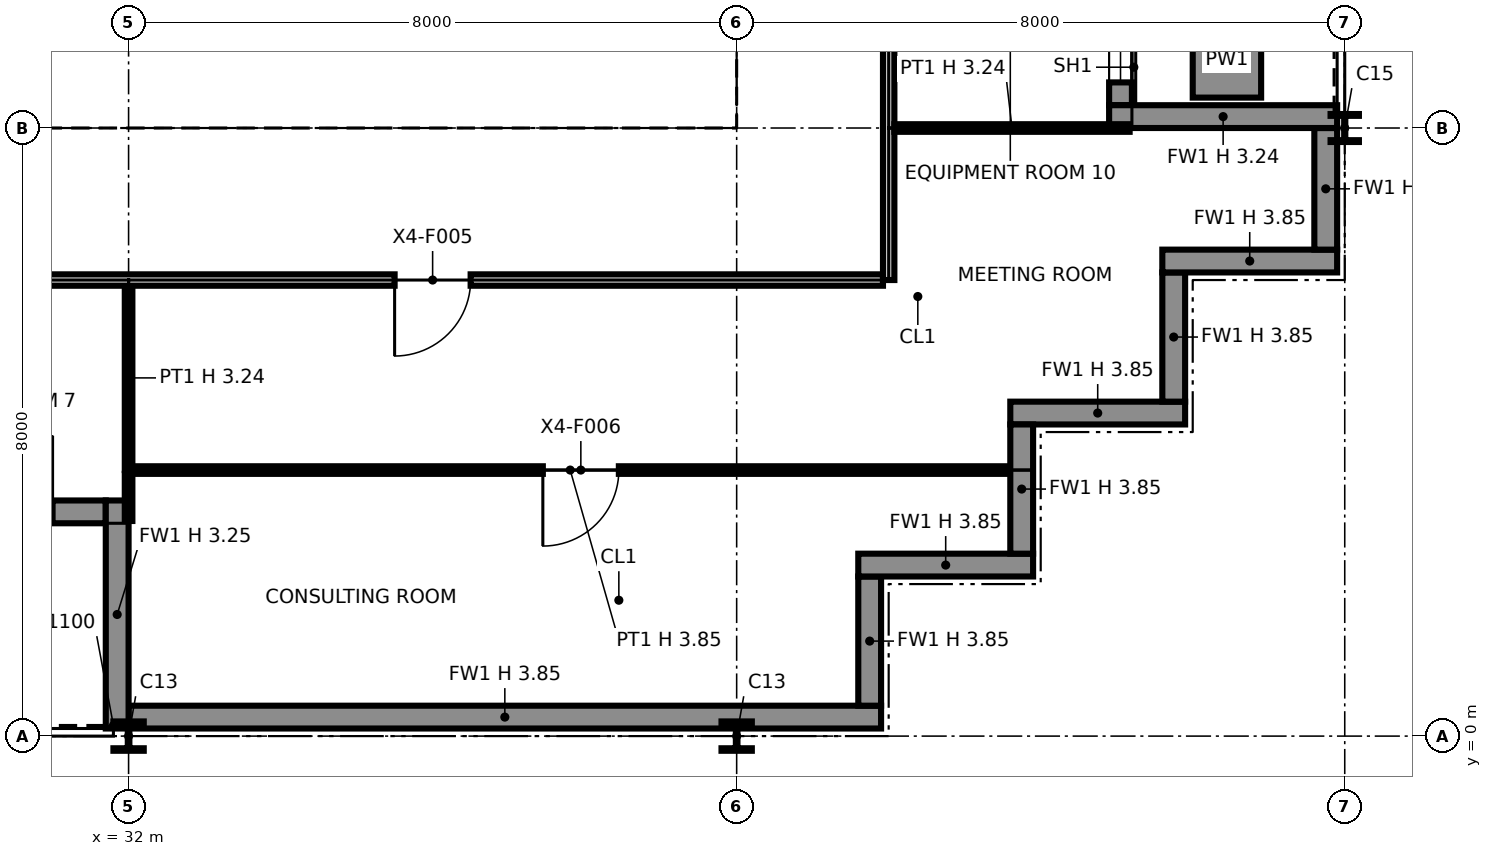
"""IFC4 building model, lengths in metres.
Left out: names, types, materials, properties, quantities, classifications, styles, units other than length and angle.
Written with IfcOpenShell. Run it as: python <this file> out.ifc"""

import sys

from ifc_helpers import new_model, si_unit, direction, frame, frame_2d, origin, origin_2d, place, context, subcontext, project, spatial, polyline, rectangle, i_section, outline, extrude, element, fill, save


model = new_model("IFC4")
c1 = context("Model", 3, precision=1e-05, world=origin(), true_north=direction((0.0, 1.0)))
c2 = subcontext(c1, "Body", "Model", "MODEL_VIEW")
j1 = project(units=[si_unit("LENGTHUNIT", "METRE"), si_unit("PLANEANGLEUNIT", "RADIAN")], contexts=[c1])
p1 = place(None, origin())
s1 = spatial("IfcSite", under=j1, at=p1, CompositionType="ELEMENT")
p2 = place(p1, origin())
s2 = spatial("IfcBuilding", under=s1, at=p2, CompositionType="ELEMENT")
p3 = place(p2, frame((0.0, 0.0, 279.0)))
s3 = spatial("IfcBuildingStorey", under=s2, at=p3, CompositionType="ELEMENT", Elevation=279.0)
p4 = place(p3, frame((32.0, 0.0, 0.0), z_axis=(0.0, 0.0, 1.0), x_axis=(1.0, 0.0, 0.0)))
e1 = element("IfcColumn", 1, at=p4, inside=s3, PredefinedType="COLUMN", context=c2, shape_type="SweptSolid", body=[
    extrude(i_section(OverallWidth=0.399, OverallDepth=0.386, WebThickness=0.021, FlangeThickness=0.033, at=origin_2d()), origin(), (0.0, 0.0, 1.0), 3.85),
])
p5 = place(p3, frame((32.0, 8.0, 0.0), z_axis=(0.0, 0.0, 1.0), x_axis=(1.0, 0.0, 0.0)))
e2 = element("IfcColumn", 2, at=p5, inside=s3, PredefinedType="COLUMN", context=c2, shape_type="SweptSolid", body=[
    extrude(i_section(OverallWidth=0.257, OverallDepth=0.363, WebThickness=0.013, FlangeThickness=0.022, at=origin_2d()), origin(), (0.0, 0.0, 1.0), 3.85),
])
p6 = place(p3, frame((40.0, 0.0, 0.0), z_axis=(0.0, 0.0, 1.0), x_axis=(1.0, 0.0, 0.0)))
e3 = element("IfcColumn", 3, at=p6, inside=s3, PredefinedType="COLUMN", context=c2, shape_type="SweptSolid", body=[
    extrude(i_section(OverallWidth=0.399, OverallDepth=0.386, WebThickness=0.021, FlangeThickness=0.033, at=origin_2d()), origin(), (0.0, 0.0, 1.0), 3.85),
])
p7 = place(p3, frame((40.0, 8.0, 0.0), z_axis=(0.0, 0.0, 1.0), x_axis=(1.0, 0.0, 0.0)))
e4 = element("IfcColumn", 4, at=p7, inside=s3, PredefinedType="COLUMN", context=c2, shape_type="SweptSolid", body=[
    extrude(i_section(OverallWidth=0.257, OverallDepth=0.363, WebThickness=0.013, FlangeThickness=0.022, at=origin_2d()), origin(), (0.0, 0.0, 1.0), 3.85),
])
p8 = place(p3, frame((48.0, 8.0, 0.0), z_axis=(0.0, 0.0, 1.0), x_axis=(1.0, 0.0, 0.0)))
e5 = element("IfcColumn", 5, at=p8, inside=s3, PredefinedType="COLUMN", context=c2, shape_type="SweptSolid", body=[
    extrude(i_section(OverallWidth=0.373, OverallDepth=0.368, WebThickness=0.015, FlangeThickness=0.024, at=origin_2d()), origin(), (0.0, 0.0, 1.0), 3.85),
])
p9 = place(p3, frame((24.3, 2.95, 0.0), z_axis=(0.0, 0.0, 1.0), x_axis=(1.0, 0.0, 0.0)))
e6 = element("IfcWall", 6, at=p9, inside=s3, PredefinedType="SOLIDWALL", context=c2, shape_type="SweptSolid", body=[
    extrude(rectangle(XDim=7.4, YDim=0.3, at=frame_2d((3.7, 0.0))), origin(), (0.0, 0.0, 1.0), 3.85),
])
p10 = place(p9, frame((0.3, 0.0, 0.9)))
e7 = element("IfcOpeningElement", 7, at=p10, cuts=e6, PredefinedType="OPENING", context=c2, shape_type="SweptSolid", body=[
    extrude(rectangle(XDim=2.8, YDim=2.2, at=frame_2d((1.4, 1.1))), frame((0.0, 0.16, 0.0), z_axis=(0.0, -1.0, 0.0), x_axis=(1.0, 0.0, 0.0)), (0.0, 0.0, 1.0), 0.32),
])
p11 = place(p9, frame((4.7, 0.0, 0.0)))
e8 = element("IfcOpeningElement", 8, at=p11, cuts=e6, PredefinedType="OPENING", context=c2, shape_type="SweptSolid", body=[
    extrude(rectangle(XDim=2.0, YDim=2.4, at=frame_2d((1.0, 1.2))), frame((0.0, 0.16, 0.0), z_axis=(0.0, -1.0, 0.0), x_axis=(1.0, 0.0, 0.0)), (0.0, 0.0, 1.0), 0.32),
])
p12 = place(p3, frame((31.85, 0.1, 0.0), z_axis=(0.0, 0.0, 1.0), x_axis=(0.0, 1.0, 0.0)))
e9 = element("IfcWall", 9, at=p12, inside=s3, PredefinedType="SOLIDWALL", context=c2, shape_type="SweptSolid", body=[
    extrude(rectangle(XDim=3.0, YDim=0.3, at=frame_2d((1.5, 0.0))), origin(), (0.0, 0.0, 1.0), 3.247),
])
p13 = place(p3, frame((32.0, 0.25, 0.0), z_axis=(0.0, 0.0, 1.0), x_axis=(1.0, 0.0, 0.0)))
e10 = element("IfcWall", 10, at=p13, inside=s3, PredefinedType="SOLIDWALL", context=c2, shape_type="SweptSolid", body=[
    extrude(rectangle(XDim=9.9, YDim=0.3, at=frame_2d((4.95, 0.0))), origin(), (0.0, 0.0, 1.0), 3.85),
])
p14 = place(p3, frame((41.75, 0.4, 0.0), z_axis=(0.0, 0.0, 1.0), x_axis=(0.0, 1.0, 0.0)))
e11 = element("IfcWall", 11, at=p14, inside=s3, PredefinedType="SOLIDWALL", context=c2, shape_type="SweptSolid", body=[
    extrude(rectangle(XDim=1.7, YDim=0.3, at=frame_2d((0.85, 0.0))), origin(), (0.0, 0.0, 1.0), 3.85),
])
p15 = place(p3, frame((41.6, 2.25, 0.0), z_axis=(0.0, 0.0, 1.0), x_axis=(1.0, 0.0, 0.0)))
e12 = element("IfcWall", 12, at=p15, inside=s3, PredefinedType="SOLIDWALL", context=c2, shape_type="SweptSolid", body=[
    extrude(rectangle(XDim=2.3, YDim=0.3, at=frame_2d((1.15, 0.0))), origin(), (0.0, 0.0, 1.0), 3.85),
])
p16 = place(p3, frame((43.75, 2.4, 0.0), z_axis=(0.0, 0.0, 1.0), x_axis=(0.0, 1.0, 0.0)))
e13 = element("IfcWall", 13, at=p16, inside=s3, PredefinedType="SOLIDWALL", context=c2, shape_type="SweptSolid", body=[
    extrude(rectangle(XDim=1.7, YDim=0.3, at=frame_2d((0.85, 0.0))), origin(), (0.0, 0.0, 1.0), 3.85),
])
p17 = place(p3, frame((43.6, 4.25, 0.0), z_axis=(0.0, 0.0, 1.0), x_axis=(1.0, 0.0, 0.0)))
e14 = element("IfcWall", 14, at=p17, inside=s3, PredefinedType="SOLIDWALL", context=c2, shape_type="SweptSolid", body=[
    extrude(rectangle(XDim=2.3, YDim=0.3, at=frame_2d((1.15, 0.0))), origin(), (0.0, 0.0, 1.0), 3.85),
])
p18 = place(p3, frame((45.75, 4.4, 0.0), z_axis=(0.0, 0.0, 1.0), x_axis=(0.0, 1.0, 0.0)))
e15 = element("IfcWall", 15, at=p18, inside=s3, PredefinedType="SOLIDWALL", context=c2, shape_type="SweptSolid", body=[
    extrude(rectangle(XDim=1.7, YDim=0.3, at=frame_2d((0.85, 0.0))), origin(), (0.0, 0.0, 1.0), 3.85),
])
p19 = place(p3, frame((45.6, 6.25, 0.0), z_axis=(0.0, 0.0, 1.0), x_axis=(1.0, 0.0, 0.0)))
e16 = element("IfcWall", 16, at=p19, inside=s3, PredefinedType="SOLIDWALL", context=c2, shape_type="SweptSolid", body=[
    extrude(rectangle(XDim=2.3, YDim=0.3, at=frame_2d((1.15, 0.0))), origin(), (0.0, 0.0, 1.0), 3.85),
])
p20 = place(p3, frame((47.75, 6.4, 0.0), z_axis=(0.0, 0.0, 1.0), x_axis=(0.0, 1.0, 0.0)))
e17 = element("IfcWall", 17, at=p20, inside=s3, PredefinedType="SOLIDWALL", context=c2, shape_type="SweptSolid", body=[
    extrude(rectangle(XDim=1.6, YDim=0.3, at=frame_2d((0.8, 0.0))), origin(), (0.0, 0.0, 1.0), 3.85),
])
p21 = place(p3, frame((45.05, 8.3, 0.0), z_axis=(0.0, 0.0, 1.0), x_axis=(0.0, 1.0, 0.0)))
e18 = element("IfcWall", 18, at=p21, inside=s3, PredefinedType="SOLIDWALL", context=c2, shape_type="SweptSolid", body=[
    extrude(rectangle(XDim=7.4, YDim=0.3, at=frame_2d((3.7, 0.0))), origin(), (0.0, 0.0, 1.0), 3.85),
])
p22 = place(p21, frame((0.3, 0.0, 0.9)))
e19 = element("IfcOpeningElement", 19, at=p22, cuts=e18, PredefinedType="OPENING", context=c2, shape_type="SweptSolid", body=[
    extrude(rectangle(XDim=2.8, YDim=2.2, at=frame_2d((1.4, 1.1))), frame((0.0, 0.16, 0.0), z_axis=(0.0, -1.0, 0.0), x_axis=(1.0, 0.0, 0.0)), (0.0, 0.0, 1.0), 0.32),
])
p23 = place(p21, frame((4.7, 0.0, 0.0)))
e20 = element("IfcOpeningElement", 20, at=p23, cuts=e18, PredefinedType="OPENING", context=c2, shape_type="SweptSolid", body=[
    extrude(rectangle(XDim=2.0, YDim=2.4, at=frame_2d((1.0, 1.2))), frame((0.0, 0.16, 0.0), z_axis=(0.0, -1.0, 0.0), x_axis=(1.0, 0.0, 0.0)), (0.0, 0.0, 1.0), 0.32),
])
p24 = place(p3, frame((47.9, 8.15, 0.0), z_axis=(0.0, 0.0, 1.0), x_axis=(-1.0, 0.0, 0.0)))
e21 = element("IfcWall", 21, at=p24, inside=s3, PredefinedType="SOLIDWALL", context=c2, shape_type="SweptSolid", body=[
    extrude(rectangle(XDim=3.0, YDim=0.3, at=frame_2d((1.5, 0.0))), origin(), (0.0, 0.0, 1.0), 3.237),
])
p25 = place(p3, frame((46.45, 8.4, 0.0), z_axis=(0.0, 0.0, 1.0), x_axis=(0.0, 1.0, 0.0)))
e22 = element("IfcWall", 22, at=p25, inside=s3, PredefinedType="SOLIDWALL", context=c2, shape_type="SweptSolid", body=[
    extrude(rectangle(XDim=3.2, YDim=0.9, at=frame_2d((1.6, 0.0))), origin(), (0.0, 0.0, 1.0), 0.6),
])
p26 = place(p3, frame((24.65, 8.75, 0.0), z_axis=(0.0, 0.0, 1.0), x_axis=(1.0, 0.0, 0.0)))
e23 = element("IfcWall", 23, at=p26, inside=s3, PredefinedType="PARTITIONING", context=c2, shape_type="SweptSolid", body=[
    extrude(outline(polyline([(0.0, 0.0), (14.7, 0.0), (14.7, 3.85), (7.438, 3.85), (7.437, 3.318), (7.263, 3.318), (7.262, 3.85), (0.0, 3.85), (0.0, 0.0)])), frame((0.0, 0.1, 0.0), z_axis=(0.0, -1.0, 0.0), x_axis=(1.0, 0.0, 0.0)), (0.0, 0.0, 1.0), 0.2),
])
p27 = place(p3, frame((32.0, 8.85, 0.0), z_axis=(0.0, 0.0, 1.0), x_axis=(0.0, 1.0, 0.0)))
e24 = element("IfcWall", 24, at=p27, inside=s3, PredefinedType="PARTITIONING", context=c2, shape_type="SweptSolid", body=[
    extrude(rectangle(XDim=2.55, YDim=0.6, at=frame_2d((1.275, 0.0))), origin(), (0.0, 0.0, 1.0), 3.318),
])
for number, where, z_axis, x_axis in (
    (25, (35.6, 8.85, 0.0), (0.0, 0.0, 1.0), (0.0, 1.0, 0.0)),
    (26, (39.25, 8.85, 0.0), (0.0, 0.0, 1.0), (0.0, 1.0, 0.0)),
):
    element("IfcWall", number, at=place(p3, frame(where, z_axis=z_axis, x_axis=x_axis)), inside=s3, PredefinedType="PARTITIONING", context=c2, shape_type="SweptSolid", body=[
        extrude(rectangle(XDim=6.3, YDim=0.2, at=frame_2d((3.15, 0.0))), origin(), (0.0, 0.0, 1.0), 3.85),
    ])
p28 = place(p3, frame((32.0, 2.83, 0.0), z_axis=(0.0, 0.0, 1.0), x_axis=(0.0, 1.0, 0.0)))
e27 = element("IfcWall", 27, at=p28, inside=s3, PredefinedType="PARTITIONING", context=c2, shape_type="SweptSolid", body=[
    extrude(rectangle(XDim=0.62, YDim=0.1, at=frame_2d((0.31, 0.0))), origin(), (0.0, 0.0, 1.0), 3.238),
])
p29 = place(p3, frame((32.05, 3.5, 0.0), z_axis=(0.0, 0.0, 1.0), x_axis=(1.0, 0.0, 0.0)))
e28 = element("IfcWall", 28, at=p29, inside=s3, PredefinedType="PARTITIONING", context=c2, shape_type="SweptSolid", body=[
    extrude(rectangle(XDim=11.52, YDim=0.1, at=frame_2d((5.76, 0.0))), origin(), (0.0, 0.0, 1.0), 3.85),
])
p30 = place(p29, frame((6.4, 0.0, 0.0), z_axis=(0.0, 0.0, 1.0), x_axis=(-1.0, 0.0, 0.0)))
e29 = element("IfcOpeningElement", 29, at=p30, cuts=e28, PredefinedType="OPENING", context=c2, shape_type="SweptSolid", body=[
    extrude(rectangle(XDim=1.0, YDim=2.1, at=frame_2d((0.5, 1.05))), frame((0.0, 0.06, 0.0), z_axis=(0.0, -1.0, 0.0), x_axis=(1.0, 0.0, 0.0)), (0.0, 0.0, 1.0), 0.12),
])
p31 = place(p3, frame((32.0, 3.5, 0.0), z_axis=(0.0, 0.0, 1.0), x_axis=(0.0, 1.0, 0.0)))
e30 = element("IfcWall", 30, at=p31, inside=s3, PredefinedType="PARTITIONING", context=c2, shape_type="SweptSolid", body=[
    extrude(rectangle(XDim=2.425, YDim=0.1, at=frame_2d((1.212, 0.0))), origin(), (0.0, 0.0, 1.0), 3.238),
])
p32 = place(p3, frame((6.075, 6.0, 0.0), z_axis=(0.0, 0.0, 1.0), x_axis=(1.0, 0.0, 0.0)))
e31 = element("IfcWall", 31, at=p32, inside=s3, PredefinedType="PARTITIONING", context=c2, shape_type="SweptSolid", body=[
    extrude(rectangle(XDim=35.85, YDim=0.15, at=frame_2d((17.925, 0.0))), origin(), (0.0, 0.0, 1.0), 3.85),
])
p33 = place(p32, frame((12.425, 0.0, 0.0), z_axis=(0.0, 0.0, 1.0), x_axis=(-1.0, 0.0, 0.0)))
e32 = element("IfcOpeningElement", 32, at=p33, cuts=e31, PredefinedType="OPENING", context=c2, shape_type="SweptSolid", body=[
    extrude(rectangle(XDim=1.0, YDim=2.1, at=frame_2d((0.5, 1.05))), frame((0.0, 0.085, 0.0), z_axis=(0.0, -1.0, 0.0), x_axis=(1.0, 0.0, 0.0)), (0.0, 0.0, 1.0), 0.17),
])
p34 = place(p32, frame((16.425, 0.0, 0.0), z_axis=(0.0, 0.0, 1.0), x_axis=(-1.0, 0.0, 0.0)))
e33 = element("IfcOpeningElement", 33, at=p34, cuts=e31, PredefinedType="OPENING", context=c2, shape_type="SweptSolid", body=[
    extrude(rectangle(XDim=1.0, YDim=2.1, at=frame_2d((0.5, 1.05))), frame((0.0, 0.085, 0.0), z_axis=(0.0, -1.0, 0.0), x_axis=(1.0, 0.0, 0.0)), (0.0, 0.0, 1.0), 0.17),
])
p35 = place(p32, frame((30.425, 0.0, 0.0), z_axis=(0.0, 0.0, 1.0), x_axis=(-1.0, 0.0, 0.0)))
e34 = element("IfcOpeningElement", 34, at=p35, cuts=e31, PredefinedType="OPENING", context=c2, shape_type="SweptSolid", body=[
    extrude(rectangle(XDim=1.0, YDim=2.1, at=frame_2d((0.5, 1.05))), frame((0.0, 0.085, 0.0), z_axis=(0.0, -1.0, 0.0), x_axis=(1.0, 0.0, 0.0)), (0.0, 0.0, 1.0), 0.17),
])
p36 = place(p32, frame((4.425, 0.0, 0.0), z_axis=(0.0, 0.0, 1.0), x_axis=(-1.0, 0.0, 0.0)))
e35 = element("IfcOpeningElement", 35, at=p36, cuts=e31, PredefinedType="OPENING", context=c2, shape_type="SweptSolid", body=[
    extrude(rectangle(XDim=1.0, YDim=2.1, at=frame_2d((0.5, 1.05))), frame((0.0, 0.085, 0.0), z_axis=(0.0, -1.0, 0.0), x_axis=(1.0, 0.0, 0.0)), (0.0, 0.0, 1.0), 0.17),
])
p37 = place(p32, frame((8.425, 0.0, 0.0), z_axis=(0.0, 0.0, 1.0), x_axis=(-1.0, 0.0, 0.0)))
e36 = element("IfcOpeningElement", 36, at=p37, cuts=e31, PredefinedType="OPENING", context=c2, shape_type="SweptSolid", body=[
    extrude(rectangle(XDim=1.0, YDim=2.1, at=frame_2d((0.5, 1.05))), frame((0.0, 0.085, 0.0), z_axis=(0.0, -1.0, 0.0), x_axis=(1.0, 0.0, 0.0)), (0.0, 0.0, 1.0), 0.17),
])
p38 = place(p32, frame((19.425, 0.0, 0.0), z_axis=(0.0, 0.0, 1.0), x_axis=(-1.0, 0.0, 0.0)))
e37 = element("IfcOpeningElement", 37, at=p38, cuts=e31, PredefinedType="OPENING", context=c2, shape_type="SweptSolid", body=[
    extrude(rectangle(XDim=1.0, YDim=2.1, at=frame_2d((0.5, 1.05))), frame((0.0, 0.085, 0.0), z_axis=(0.0, -1.0, 0.0), x_axis=(1.0, 0.0, 0.0)), (0.0, 0.0, 1.0), 0.17),
])
p39 = place(p32, frame((24.425, 0.0, 0.0), z_axis=(0.0, 0.0, 1.0), x_axis=(-1.0, 0.0, 0.0)))
e38 = element("IfcOpeningElement", 38, at=p39, cuts=e31, PredefinedType="OPENING", context=c2, shape_type="SweptSolid", body=[
    extrude(rectangle(XDim=1.0, YDim=2.1, at=frame_2d((0.5, 1.05))), frame((0.0, 0.085, 0.0), z_axis=(0.0, -1.0, 0.0), x_axis=(1.0, 0.0, 0.0)), (0.0, 0.0, 1.0), 0.17),
])
p40 = place(p3, frame((42.0, 6.0, 0.0), z_axis=(0.0, 0.0, 1.0), x_axis=(0.0, 1.0, 0.0)))
e39 = element("IfcWall", 39, at=p40, inside=s3, PredefinedType="PARTITIONING", context=c2, shape_type="SweptSolid", body=[
    extrude(outline(polyline([(0.0, 0.0), (11.925, 0.0), (11.925, 3.85), (10.3, 3.85), (10.298, 3.238), (9.702, 3.238), (9.7, 3.85), (6.3, 3.85), (6.298, 3.238), (5.702, 3.238), (5.7, 3.85), (2.3, 3.85), (2.298, 3.238), (1.702, 3.238), (1.7, 3.85), (0.0, 3.85), (0.0, 0.0)])), frame((0.0, 0.075, 0.0), z_axis=(0.0, -1.0, 0.0), x_axis=(1.0, 0.0, 0.0)), (0.0, 0.0, 1.0), 0.15),
])
p41 = place(p40, frame((4.5, 0.0, 0.0), z_axis=(0.0, 0.0, 1.0), x_axis=(-1.0, 0.0, 0.0)))
e40 = element("IfcOpeningElement", 40, at=p41, cuts=e39, PredefinedType="OPENING", context=c2, shape_type="SweptSolid", body=[
    extrude(rectangle(XDim=1.0, YDim=2.1, at=frame_2d((0.5, 1.05))), frame((0.0, 0.085, 0.0), z_axis=(0.0, -1.0, 0.0), x_axis=(1.0, 0.0, 0.0)), (0.0, 0.0, 1.0), 0.17),
])
p42 = place(p40, frame((8.5, 0.0, 0.0), z_axis=(0.0, 0.0, 1.0), x_axis=(-1.0, 0.0, 0.0)))
e41 = element("IfcOpeningElement", 41, at=p42, cuts=e39, PredefinedType="OPENING", context=c2, shape_type="SweptSolid", body=[
    extrude(rectangle(XDim=1.0, YDim=2.1, at=frame_2d((0.5, 1.05))), frame((0.0, 0.085, 0.0), z_axis=(0.0, -1.0, 0.0), x_axis=(1.0, 0.0, 0.0)), (0.0, 0.0, 1.0), 0.17),
])
p43 = place(p40, frame((11.5, 0.0, 0.0), z_axis=(0.0, 0.0, 1.0), x_axis=(-1.0, 0.0, 0.0)))
e42 = element("IfcOpeningElement", 42, at=p43, cuts=e39, PredefinedType="OPENING", context=c2, shape_type="SweptSolid", body=[
    extrude(rectangle(XDim=1.0, YDim=2.1, at=frame_2d((0.5, 1.05))), frame((0.0, 0.085, 0.0), z_axis=(0.0, -1.0, 0.0), x_axis=(1.0, 0.0, 0.0)), (0.0, 0.0, 1.0), 0.17),
])
p44 = place(p3, frame((42.075, 8.0, 0.0), z_axis=(0.0, 0.0, 1.0), x_axis=(1.0, 0.0, 0.0)))
e43 = element("IfcWall", 43, at=p44, inside=s3, PredefinedType="PARTITIONING", context=c2, shape_type="SweptSolid", body=[
    extrude(rectangle(XDim=3.095, YDim=0.1, at=frame_2d((1.547, 0.0))), origin(), (0.0, 0.0, 1.0), 3.238),
])
p45 = place(p22, origin())
e44 = element("IfcWindow", 44, at=p45, inside=s3, PartitioningType="SINGLE_PANEL", PredefinedType="WINDOW", context=c2, shape_type="SweptSolid", body=[
    extrude(rectangle(XDim=2.8, YDim=2.2, at=frame_2d((1.4, 1.1))), frame((0.0, 0.03, 0.0), z_axis=(0.0, -1.0, 0.0), x_axis=(1.0, 0.0, 0.0)), (0.0, 0.0, 1.0), 0.06),
])
fill(e19, e44)
p46 = place(p35, origin())
e45 = element("IfcDoor", 45, at=p46, inside=s3, OperationType="SINGLE_SWING_RIGHT", PredefinedType="DOOR", context=c2, shape_type="SweptSolid", body=[
    extrude(rectangle(XDim=1.0, YDim=2.1, at=frame_2d((0.5, 1.05))), frame((0.0, 0.025, 0.0), z_axis=(0.0, -1.0, 0.0), x_axis=(1.0, 0.0, 0.0)), (0.0, 0.0, 1.0), 0.05),
])
fill(e34, e45)
p47 = place(p30, origin())
e46 = element("IfcDoor", 46, at=p47, inside=s3, OperationType="SINGLE_SWING_RIGHT", PredefinedType="DOOR", context=c2, shape_type="SweptSolid", body=[
    extrude(rectangle(XDim=1.0, YDim=2.1, at=frame_2d((0.5, 1.05))), frame((0.0, 0.025, 0.0), z_axis=(0.0, -1.0, 0.0), x_axis=(1.0, 0.0, 0.0)), (0.0, 0.0, 1.0), 0.05),
])
fill(e29, e46)
save(model, sys.argv[1])
